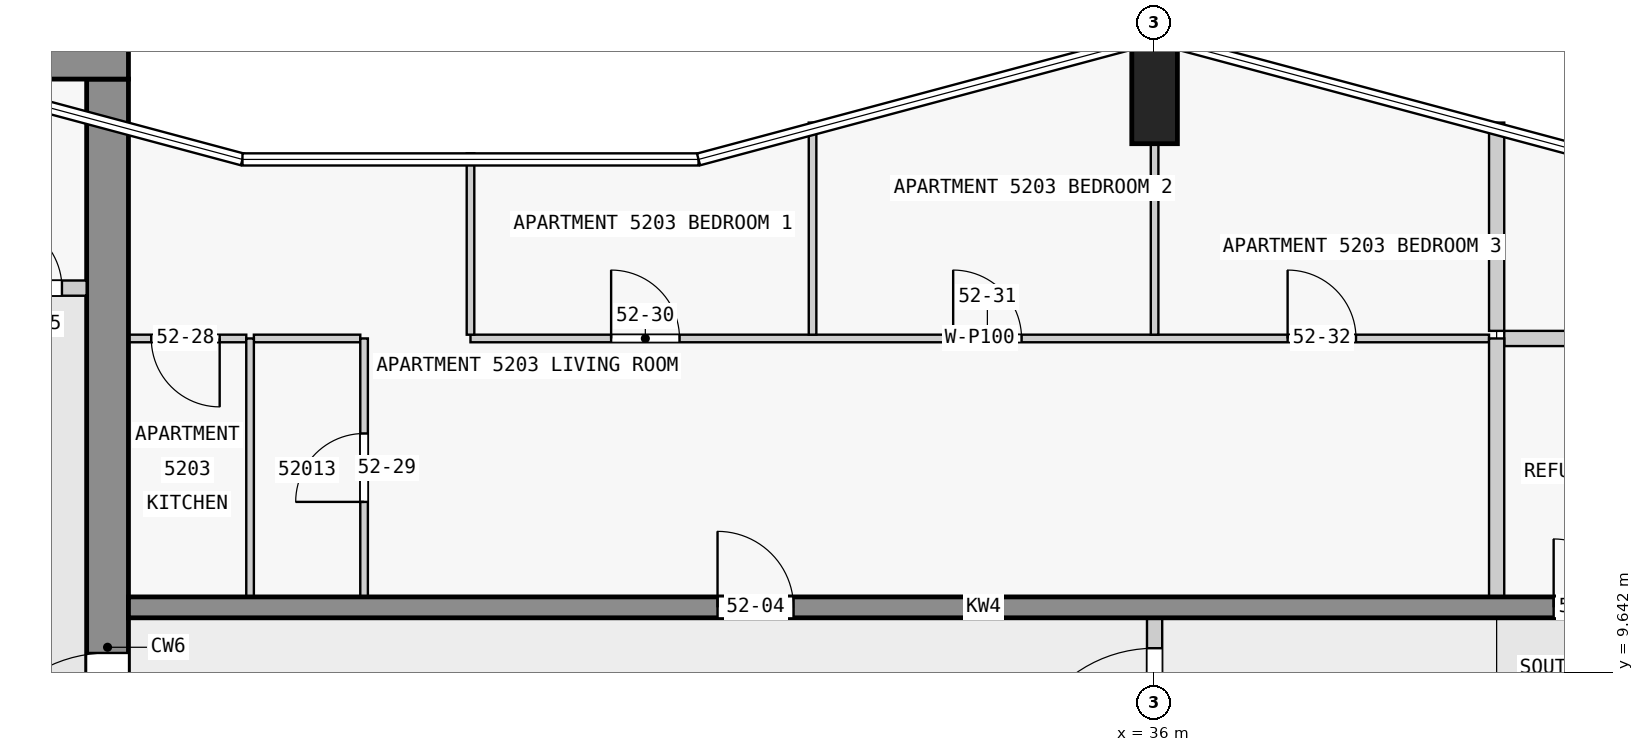
"""IFC4 building model, lengths in metres.
Left out: names, types, materials, properties, quantities, classifications, styles, units other than length and angle.
Written with IfcOpenShell. Run it as: python <this file> out.ifc"""

import sys

from ifc_helpers import new_model, si_unit, direction, frame, frame_2d, origin, origin_2d, place, context, subcontext, project, spatial, rectangle, extrude, element, fill, save


model = new_model("IFC4")
c1 = context("Model", 3, precision=1e-05, world=origin(), true_north=direction((0.0, 1.0)))
c2 = subcontext(c1, "Body", "Model", "MODEL_VIEW")
j1 = project(units=[si_unit("LENGTHUNIT", "METRE"), si_unit("PLANEANGLEUNIT", "RADIAN")], contexts=[c1])
p1 = place(None, origin())
s1 = spatial("IfcSite", under=j1, at=p1, CompositionType="ELEMENT")
p2 = place(p1, origin())
s2 = spatial("IfcBuilding", under=s1, at=p2, CompositionType="ELEMENT")
p3 = place(p2, frame((0.0, 0.0, 201.4)))
s3 = spatial("IfcBuildingStorey", under=s2, at=p3, CompositionType="ELEMENT", Elevation=201.4)
p4 = place(p3, frame((36.0, 17.3, 0.0), z_axis=(0.0, 0.0, 1.0), x_axis=(1.0, 0.0, 0.0)))
e1 = element("IfcColumn", 1, at=p4, inside=s3, PredefinedType="COLUMN", context=c2, shape_type="SweptSolid", body=[
    extrude(rectangle(XDim=0.6, YDim=1.4, at=origin_2d()), origin(), (0.0, 0.0, 1.0), 3.5),
])
p5 = place(p3, frame((1.38, 17.725, 0.0), z_axis=(0.0, 0.0, 1.0), x_axis=(1.0, 0.0, 0.0)))
e2 = element("IfcWall", 2, at=p5, inside=s3, PredefinedType="SHEAR", context=c2, shape_type="SweptSolid", body=[
    extrude(rectangle(XDim=21.12, YDim=0.55, at=frame_2d((10.56, 0.0))), origin(), (0.0, 0.0, 1.0), 3.25),
])
p6 = place(p5, frame((6.35, 0.0, 0.0)))
e3 = element("IfcOpeningElement", 3, at=p6, cuts=e2, PredefinedType="OPENING", context=c2, shape_type="SweptSolid", body=[
    extrude(rectangle(XDim=1.8, YDim=2.1, at=frame_2d((0.9, 1.05))), frame((0.0, 0.285, 0.0), z_axis=(0.0, -1.0, 0.0), x_axis=(1.0, 0.0, 0.0)), (0.0, 0.0, 1.0), 0.57),
])
p7 = place(p3, frame((22.225, 2.5, 0.0), z_axis=(0.0, 0.0, 1.0), x_axis=(0.0, 1.0, 0.0)))
e4 = element("IfcWall", 4, at=p7, inside=s3, PredefinedType="SHEAR", context=c2, shape_type="SweptSolid", body=[
    extrude(rectangle(XDim=14.95, YDim=0.55, at=frame_2d((7.475, 0.0))), origin(), (0.0, 0.0, 1.0), 3.25),
])
p8 = place(p7, frame((5.6, 0.0, 0.0)))
e5 = element("IfcOpeningElement", 5, at=p8, cuts=e4, PredefinedType="OPENING", context=c2, shape_type="SweptSolid", body=[
    extrude(rectangle(XDim=1.8, YDim=2.1, at=frame_2d((0.9, 1.05))), frame((0.0, 0.285, 0.0), z_axis=(0.0, -1.0, 0.0), x_axis=(1.0, 0.0, 0.0)), (0.0, 0.0, 1.0), 0.57),
])
p9 = place(p3, frame((22.5, 10.5, 0.0), z_axis=(0.0, 0.0, 1.0), x_axis=(1.0, 0.0, 0.0)))
e6 = element("IfcWall", 6, at=p9, inside=s3, PredefinedType="SHEAR", context=c2, shape_type="SweptSolid", body=[
    extrude(rectangle(XDim=22.5, YDim=0.275, at=frame_2d((11.25, 0.0))), origin(), (0.0, 0.0, 1.0), 3.25),
])
p10 = place(p9, frame((7.75, 0.0, 0.0)))
e7 = element("IfcOpeningElement", 7, at=p10, cuts=e6, PredefinedType="OPENING", context=c2, shape_type="SweptSolid", body=[
    extrude(rectangle(XDim=1.0, YDim=2.1, at=frame_2d((0.5, 1.05))), frame((0.0, 0.147, 0.0), z_axis=(0.0, -1.0, 0.0), x_axis=(1.0, 0.0, 0.0)), (0.0, 0.0, 1.0), 0.295),
])
p11 = place(p9, frame((18.75, 0.0, 0.0)))
e8 = element("IfcOpeningElement", 8, at=p11, cuts=e6, PredefinedType="OPENING", context=c2, shape_type="SweptSolid", body=[
    extrude(rectangle(XDim=0.9, YDim=2.1, at=frame_2d((0.45, 1.05))), frame((0.0, 0.147, 0.0), z_axis=(0.0, -1.0, 0.0), x_axis=(1.0, 0.0, 0.0)), (0.0, 0.0, 1.0), 0.295),
])
p12 = place(p9, frame((20.95, 0.0, 0.0)))
e9 = element("IfcOpeningElement", 9, at=p12, cuts=e6, PredefinedType="OPENING", context=c2, shape_type="SweptSolid", body=[
    extrude(rectangle(XDim=1.0, YDim=2.1, at=frame_2d((0.5, 1.05))), frame((0.0, 0.147, 0.0), z_axis=(0.0, -1.0, 0.0), x_axis=(1.0, 0.0, 0.0)), (0.0, 0.0, 1.0), 0.295),
])
p13 = place(p3, frame((18.6, 14.7, 0.0), z_axis=(0.0, 0.0, 1.0), x_axis=(1.0, 0.0, 0.0)))
e10 = element("IfcWall", 10, at=p13, inside=s3, PredefinedType="PARTITIONING", context=c2, shape_type="SweptSolid", body=[
    extrude(rectangle(XDim=3.35, YDim=0.2, at=frame_2d((1.675, 0.0))), origin(), (0.0, 0.0, 1.0), 3.25),
])
p14 = place(p13, frame((0.45, 0.0, 0.0)))
e11 = element("IfcOpeningElement", 11, at=p14, cuts=e10, PredefinedType="OPENING", context=c2, shape_type="SweptSolid", body=[
    extrude(rectangle(XDim=0.9, YDim=2.1, at=frame_2d((0.45, 1.05))), frame((0.0, 0.11, 0.0), z_axis=(0.0, -1.0, 0.0), x_axis=(1.0, 0.0, 0.0)), (0.0, 0.0, 1.0), 0.22),
])
p15 = place(p13, frame((2.125, 0.0, 0.0)))
e12 = element("IfcOpeningElement", 12, at=p15, cuts=e10, PredefinedType="OPENING", context=c2, shape_type="SweptSolid", body=[
    extrude(rectangle(XDim=0.9, YDim=2.1, at=frame_2d((0.45, 1.05))), frame((0.0, 0.11, 0.0), z_axis=(0.0, -1.0, 0.0), x_axis=(1.0, 0.0, 0.0)), (0.0, 0.0, 1.0), 0.22),
])
p16 = place(p3, frame((24.05, 14.038, 0.0), z_axis=(0.0, 0.0, 1.0), x_axis=(-1.0, 0.0, 0.0)))
e13 = element("IfcWall", 13, at=p16, inside=s3, PredefinedType="PARTITIONING", context=c2, shape_type="SweptSolid", body=[
    extrude(rectangle(XDim=1.55, YDim=0.1, at=frame_2d((0.775, 0.0))), origin(), (0.0, 0.0, 1.0), 3.25),
])
p17 = place(p16, frame((0.35, 0.0, 0.0)))
e14 = element("IfcOpeningElement", 14, at=p17, cuts=e13, PredefinedType="OPENING", context=c2, shape_type="SweptSolid", body=[
    extrude(rectangle(XDim=0.9, YDim=2.1, at=frame_2d((0.45, 1.05))), frame((0.0, 0.06, 0.0), z_axis=(0.0, -1.0, 0.0), x_axis=(1.0, 0.0, 0.0)), (0.0, 0.0, 1.0), 0.12),
])
p18 = place(p3, frame((25.55, 14.038, 0.0), z_axis=(0.0, 0.0, 1.0), x_axis=(-1.0, 0.0, 0.0)))
e15 = element("IfcWall", 15, at=p18, inside=s3, PredefinedType="PARTITIONING", context=c2, shape_type="SweptSolid", body=[
    extrude(rectangle(XDim=1.4, YDim=0.1, at=frame_2d((0.7, 0.0))), origin(), (0.0, 0.0, 1.0), 3.25),
])
p19 = place(p3, frame((27.0, 14.038, 0.0), z_axis=(0.0, 0.0, 1.0), x_axis=(1.0, 0.0, 0.0)))
e16 = element("IfcWall", 16, at=p19, inside=s3, PredefinedType="PARTITIONING", context=c2, shape_type="SweptSolid", body=[
    extrude(rectangle(XDim=13.4, YDim=0.1, at=frame_2d((6.7, 0.0))), origin(), (0.0, 0.0, 1.0), 3.25),
])
p20 = place(p19, frame((1.85, 0.0, 0.0)))
e17 = element("IfcOpeningElement", 17, at=p20, cuts=e16, PredefinedType="OPENING", context=c2, shape_type="SweptSolid", body=[
    extrude(rectangle(XDim=0.9, YDim=2.1, at=frame_2d((0.45, 1.05))), frame((0.0, 0.06, 0.0), z_axis=(0.0, -1.0, 0.0), x_axis=(1.0, 0.0, 0.0)), (0.0, 0.0, 1.0), 0.12),
])
p21 = place(p19, frame((6.35, 0.0, 0.0)))
e18 = element("IfcOpeningElement", 18, at=p21, cuts=e16, PredefinedType="OPENING", context=c2, shape_type="SweptSolid", body=[
    extrude(rectangle(XDim=0.9, YDim=2.1, at=frame_2d((0.45, 1.05))), frame((0.0, 0.06, 0.0), z_axis=(0.0, -1.0, 0.0), x_axis=(1.0, 0.0, 0.0)), (0.0, 0.0, 1.0), 0.12),
])
p22 = place(p19, frame((10.75, 0.0, 0.0)))
e19 = element("IfcOpeningElement", 19, at=p22, cuts=e16, PredefinedType="OPENING", context=c2, shape_type="SweptSolid", body=[
    extrude(rectangle(XDim=0.9, YDim=2.1, at=frame_2d((0.45, 1.05))), frame((0.0, 0.06, 0.0), z_axis=(0.0, -1.0, 0.0), x_axis=(1.0, 0.0, 0.0)), (0.0, 0.0, 1.0), 0.12),
])
p23 = place(p3, frame((42.8, 14.038, 0.0), z_axis=(0.0, 0.0, 1.0), x_axis=(-1.0, 0.0, 0.0)))
e20 = element("IfcWall", 20, at=p23, inside=s3, PredefinedType="PARTITIONING", context=c2, shape_type="SweptSolid", body=[
    extrude(rectangle(XDim=2.2, YDim=0.2, at=frame_2d((1.1, 0.0))), origin(), (0.0, 0.0, 1.0), 3.25),
])
p24 = place(p3, frame((24.1, 10.637, 0.0), z_axis=(0.0, 0.0, 1.0), x_axis=(0.0, 1.0, 0.0)))
e21 = element("IfcWall", 21, at=p24, inside=s3, PredefinedType="PARTITIONING", context=c2, shape_type="SweptSolid", body=[
    extrude(rectangle(XDim=3.4, YDim=0.1, at=frame_2d((1.7, 0.0))), origin(), (0.0, 0.0, 1.0), 3.25),
])
p25 = place(p3, frame((25.6, 10.637, 0.0), z_axis=(0.0, 0.0, 1.0), x_axis=(0.0, 1.0, 0.0)))
e22 = element("IfcWall", 22, at=p25, inside=s3, PredefinedType="PARTITIONING", context=c2, shape_type="SweptSolid", body=[
    extrude(rectangle(XDim=3.4, YDim=0.1, at=frame_2d((1.7, 0.0))), origin(), (0.0, 0.0, 1.0), 3.25),
])
p26 = place(p25, frame((1.25, 0.0, 0.0)))
e23 = element("IfcOpeningElement", 23, at=p26, cuts=e22, PredefinedType="OPENING", context=c2, shape_type="SweptSolid", body=[
    extrude(rectangle(XDim=0.9, YDim=2.1, at=frame_2d((0.45, 1.05))), frame((0.0, 0.06, 0.0), z_axis=(0.0, -1.0, 0.0), x_axis=(1.0, 0.0, 0.0)), (0.0, 0.0, 1.0), 0.12),
])
p27 = place(p3, frame((27.0, 16.473, 0.0), z_axis=(0.0, 0.0, 1.0), x_axis=(0.0, -1.0, 0.0)))
e24 = element("IfcWall", 24, at=p27, inside=s3, PredefinedType="PARTITIONING", context=c2, shape_type="SweptSolid", body=[
    extrude(rectangle(XDim=2.386, YDim=0.1, at=frame_2d((1.193, 0.0))), origin(), (0.0, 0.0, 1.0), 3.25),
])
p28 = place(p3, frame((31.5, 14.087, 0.0), z_axis=(0.0, 0.0, 1.0), x_axis=(0.0, 1.0, 0.0)))
e25 = element("IfcWall", 25, at=p28, inside=s3, PredefinedType="PARTITIONING", context=c2, shape_type="SweptSolid", body=[
    extrude(rectangle(XDim=2.79, YDim=0.1, at=frame_2d((1.395, 0.0))), origin(), (0.0, 0.0, 1.0), 3.25),
])
p29 = place(p3, frame((36.0, 14.087, 0.0), z_axis=(0.0, 0.0, 1.0), x_axis=(0.0, 1.0, 0.0)))
e26 = element("IfcWall", 26, at=p29, inside=s3, PredefinedType="PARTITIONING", context=c2, shape_type="SweptSolid", body=[
    extrude(rectangle(XDim=2.513, YDim=0.1, at=frame_2d((1.256, 0.0))), origin(), (0.0, 0.0, 1.0), 3.25),
])
p30 = place(p3, frame((40.5, 14.038, 0.0), z_axis=(0.0, 0.0, 1.0), x_axis=(0.0, -1.0, 0.0)))
e27 = element("IfcWall", 27, at=p30, inside=s3, PredefinedType="PARTITIONING", context=c2, shape_type="SweptSolid", body=[
    extrude(rectangle(XDim=3.4, YDim=0.2, at=frame_2d((1.7, 0.0))), origin(), (0.0, 0.0, 1.0), 3.25),
])
p31 = place(p3, frame((40.5, 14.137, 0.0), z_axis=(0.0, 0.0, 1.0), x_axis=(0.0, 1.0, 0.0)))
e28 = element("IfcWall", 28, at=p31, inside=s3, PredefinedType="PARTITIONING", context=c2, shape_type="SweptSolid", body=[
    extrude(rectangle(XDim=2.74, YDim=0.2, at=frame_2d((1.37, 0.0))), origin(), (0.0, 0.0, 1.0), 3.25),
])
p32 = place(p3, frame((36.0, 7.462, 0.0), z_axis=(0.0, 0.0, 1.0), x_axis=(0.0, 1.0, 0.0)))
e29 = element("IfcWall", 29, at=p32, inside=s3, PredefinedType="PARTITIONING", context=c2, shape_type="SweptSolid", body=[
    extrude(rectangle(XDim=3.175, YDim=0.2, at=frame_2d((1.587, 0.0))), origin(), (0.0, 0.0, 1.0), 3.25),
])
p33 = place(p32, frame((0.7, 0.0, 0.0)))
e30 = element("IfcOpeningElement", 30, at=p33, cuts=e29, PredefinedType="OPENING", context=c2, shape_type="SweptSolid", body=[
    extrude(rectangle(XDim=1.8, YDim=2.1, at=frame_2d((0.9, 1.05))), frame((0.0, 0.11, 0.0), z_axis=(0.0, -1.0, 0.0), x_axis=(1.0, 0.0, 0.0)), (0.0, 0.0, 1.0), 0.22),
])
p34 = place(p8, origin())
e31 = element("IfcDoor", 31, at=p34, inside=s3, OperationType="DOUBLE_DOOR_SINGLE_SWING", PredefinedType="DOOR", context=c2, shape_type="SweptSolid", body=[
    extrude(rectangle(XDim=1.8, YDim=2.1, at=frame_2d((0.9, 1.05))), frame((0.0, 0.025, 0.0), z_axis=(0.0, -1.0, 0.0), x_axis=(1.0, 0.0, 0.0)), (0.0, 0.0, 1.0), 0.05),
])
fill(e5, e31)
p35 = place(p15, origin())
e32 = element("IfcDoor", 32, at=p35, inside=s3, OperationType="SINGLE_SWING_LEFT", PredefinedType="DOOR", context=c2, shape_type="SweptSolid", body=[
    extrude(rectangle(XDim=0.9, YDim=2.1, at=frame_2d((0.45, 1.05))), frame((0.0, 0.025, 0.0), z_axis=(0.0, -1.0, 0.0), x_axis=(1.0, 0.0, 0.0)), (0.0, 0.0, 1.0), 0.05),
])
fill(e12, e32)
p36 = place(p10, origin())
e33 = element("IfcDoor", 33, at=p36, inside=s3, OperationType="SINGLE_SWING_LEFT", PredefinedType="DOOR", context=c2, shape_type="SweptSolid", body=[
    extrude(rectangle(XDim=1.0, YDim=2.1, at=frame_2d((0.5, 1.05))), frame((0.0, 0.025, 0.0), z_axis=(0.0, -1.0, 0.0), x_axis=(1.0, 0.0, 0.0)), (0.0, 0.0, 1.0), 0.05),
])
fill(e7, e33)
p37 = place(p11, origin())
e34 = element("IfcDoor", 34, at=p37, inside=s3, OperationType="SINGLE_SWING_RIGHT", PredefinedType="DOOR", context=c2, shape_type="SweptSolid", body=[
    extrude(rectangle(XDim=0.9, YDim=2.1, at=frame_2d((0.45, 1.05))), frame((0.0, 0.025, 0.0), z_axis=(0.0, -1.0, 0.0), x_axis=(1.0, 0.0, 0.0)), (0.0, 0.0, 1.0), 0.05),
])
fill(e8, e34)
p38 = place(p33, origin())
e35 = element("IfcDoor", 35, at=p38, inside=s3, OperationType="SINGLE_SWING_RIGHT", PredefinedType="DOOR", context=c2, shape_type="SweptSolid", body=[
    extrude(rectangle(XDim=1.8, YDim=2.1, at=frame_2d((0.9, 1.05))), frame((0.0, 0.025, 0.0), z_axis=(0.0, -1.0, 0.0), x_axis=(1.0, 0.0, 0.0)), (0.0, 0.0, 1.0), 0.05),
])
fill(e30, e35)
p39 = place(p17, origin())
e36 = element("IfcDoor", 36, at=p39, inside=s3, OperationType="SINGLE_SWING_RIGHT", PredefinedType="DOOR", context=c2, shape_type="SweptSolid", body=[
    extrude(rectangle(XDim=0.9, YDim=2.1, at=frame_2d((0.45, 1.05))), frame((0.0, 0.025, 0.0), z_axis=(0.0, -1.0, 0.0), x_axis=(1.0, 0.0, 0.0)), (0.0, 0.0, 1.0), 0.05),
])
fill(e14, e36)
p40 = place(p26, origin())
e37 = element("IfcDoor", 37, at=p40, inside=s3, OperationType="SINGLE_SWING_LEFT", PredefinedType="DOOR", context=c2, shape_type="SweptSolid", body=[
    extrude(rectangle(XDim=0.9, YDim=2.1, at=frame_2d((0.45, 1.05))), frame((0.0, 0.025, 0.0), z_axis=(0.0, -1.0, 0.0), x_axis=(1.0, 0.0, 0.0)), (0.0, 0.0, 1.0), 0.05),
])
fill(e23, e37)
p41 = place(p20, origin())
e38 = element("IfcDoor", 38, at=p41, inside=s3, OperationType="SINGLE_SWING_LEFT", PredefinedType="DOOR", context=c2, shape_type="SweptSolid", body=[
    extrude(rectangle(XDim=0.9, YDim=2.1, at=frame_2d((0.45, 1.05))), frame((0.0, 0.025, 0.0), z_axis=(0.0, -1.0, 0.0), x_axis=(1.0, 0.0, 0.0)), (0.0, 0.0, 1.0), 0.05),
])
fill(e17, e38)
p42 = place(p21, origin())
e39 = element("IfcDoor", 39, at=p42, inside=s3, OperationType="SINGLE_SWING_RIGHT", PredefinedType="DOOR", context=c2, shape_type="SweptSolid", body=[
    extrude(rectangle(XDim=0.9, YDim=2.1, at=frame_2d((0.45, 1.05))), frame((0.0, 0.025, 0.0), z_axis=(0.0, -1.0, 0.0), x_axis=(1.0, 0.0, 0.0)), (0.0, 0.0, 1.0), 0.05),
])
fill(e18, e39)
p43 = place(p22, origin())
e40 = element("IfcDoor", 40, at=p43, inside=s3, OperationType="SINGLE_SWING_RIGHT", PredefinedType="DOOR", context=c2, shape_type="SweptSolid", body=[
    extrude(rectangle(XDim=0.9, YDim=2.1, at=frame_2d((0.45, 1.05))), frame((0.0, 0.025, 0.0), z_axis=(0.0, -1.0, 0.0), x_axis=(1.0, 0.0, 0.0)), (0.0, 0.0, 1.0), 0.05),
])
fill(e19, e40)
save(model, sys.argv[1])
